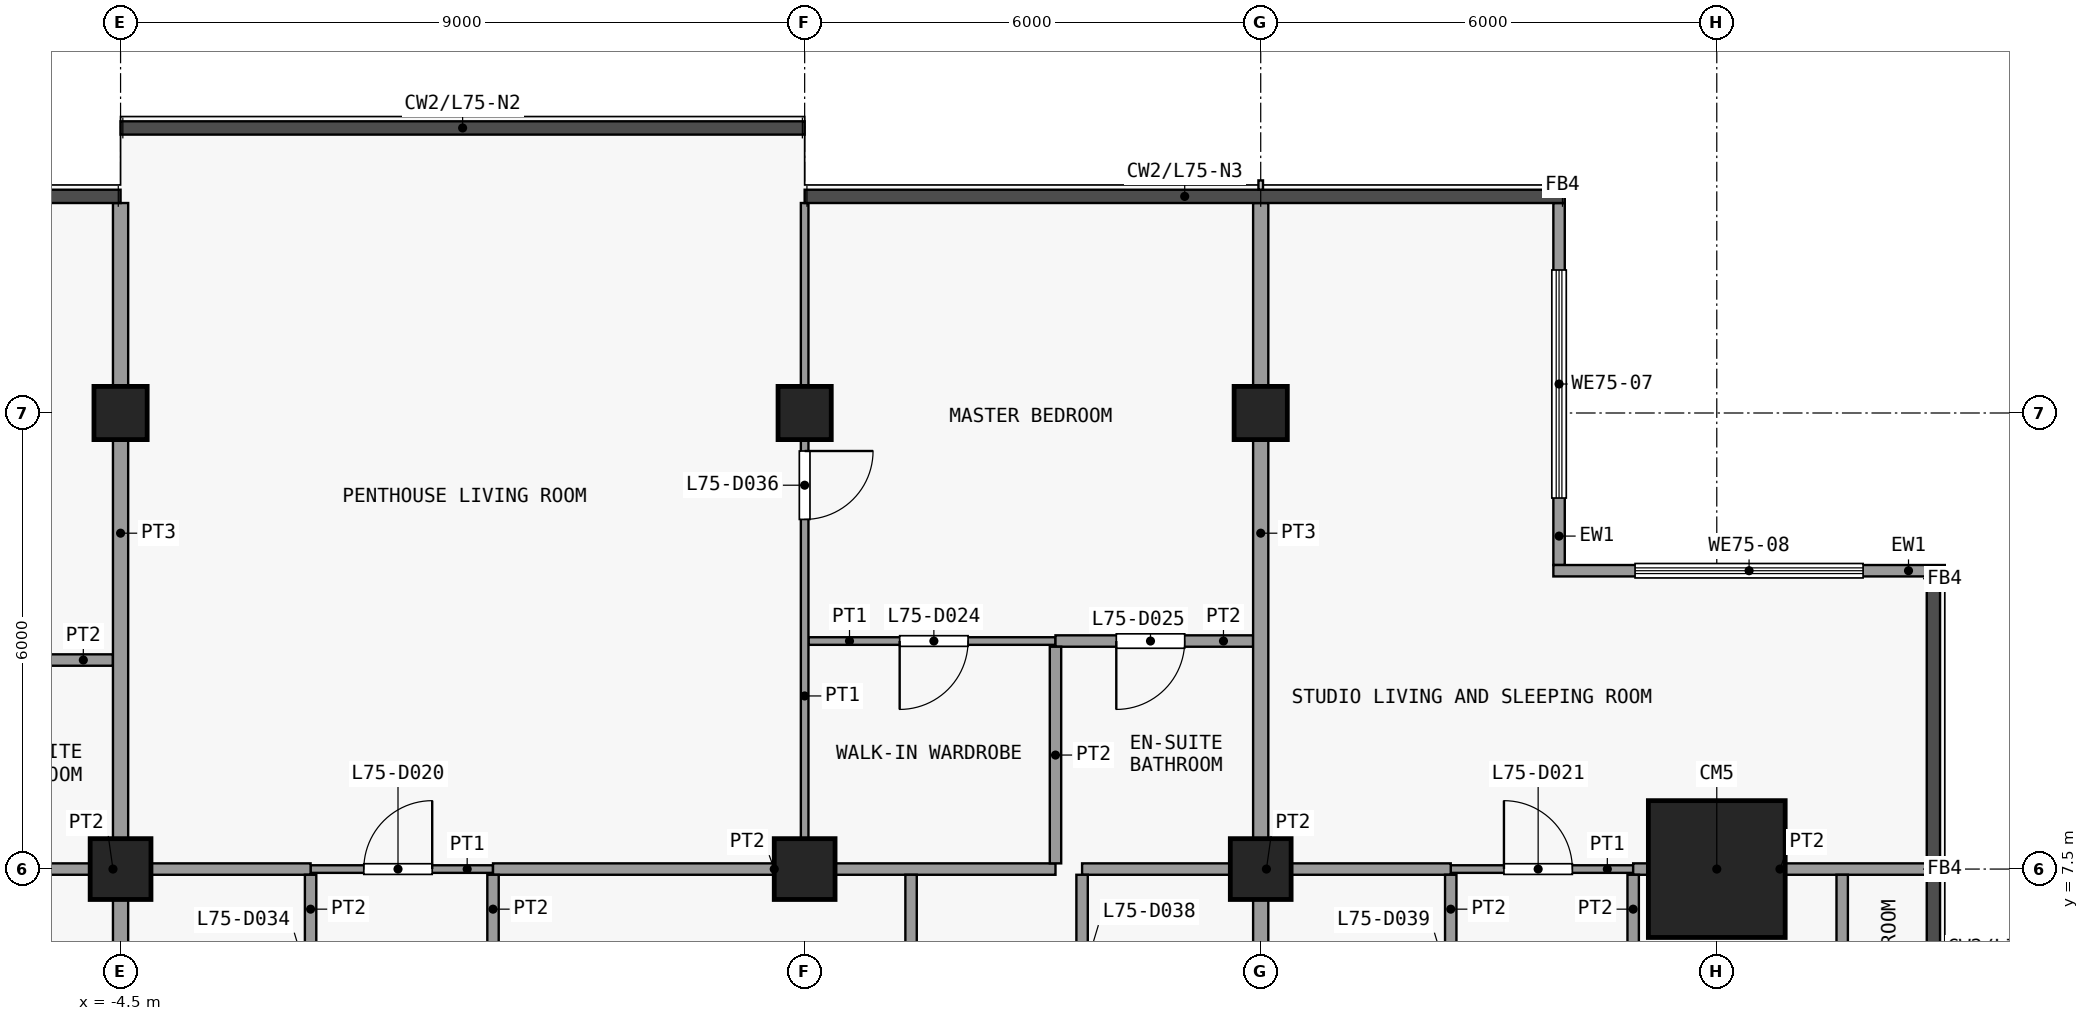
"""IFC4 building model, lengths in metres.
Left out: names, types, materials, properties, quantities, classifications, styles, units other than length and angle.
Written with IfcOpenShell. Run it as: python <this file> out.ifc"""

import sys

from ifc_helpers import new_model, si_unit, direction, frame, frame_2d, origin, origin_2d, place, context, subcontext, project, spatial, rectangle, extrude, element, fill, save


model = new_model("IFC4")
c1 = context("Model", 3, precision=1e-05, world=origin(), true_north=direction((0.0, 1.0)))
c2 = subcontext(c1, "Body", "Model", "MODEL_VIEW")
j1 = project(units=[si_unit("LENGTHUNIT", "METRE"), si_unit("PLANEANGLEUNIT", "RADIAN")], contexts=[c1])
p1 = place(None, origin())
s1 = spatial("IfcSite", under=j1, at=p1, CompositionType="ELEMENT")
p2 = place(p1, origin())
s2 = spatial("IfcBuilding", under=s1, at=p2, CompositionType="ELEMENT")
p3 = place(p2, frame((0.0, 0.0, 295.1)))
s3 = spatial("IfcBuildingStorey", under=s2, at=p3, CompositionType="ELEMENT", Elevation=295.1)
p4 = place(p3, frame((-4.5, 7.5, 0.0), z_axis=(0.0, 0.0, 1.0), x_axis=(1.0, 0.0, 0.0)))
e1 = element("IfcColumn", 1, at=p4, inside=s3, PredefinedType="COLUMN", context=c2, shape_type="SweptSolid", body=[
    extrude(rectangle(XDim=0.8, YDim=0.8, at=origin_2d()), origin(), (0.0, 0.0, 1.0), 3.6),
])
p5 = place(p3, frame((-4.5, 13.5, 0.0), z_axis=(0.0, 0.0, 1.0), x_axis=(1.0, 0.0, 0.0)))
e2 = element("IfcColumn", 2, at=p5, inside=s3, PredefinedType="COLUMN", context=c2, shape_type="SweptSolid", body=[
    extrude(rectangle(XDim=0.7, YDim=0.7, at=origin_2d()), origin(), (0.0, 0.0, 1.0), 3.6),
])
p6 = place(p3, frame((4.5, 7.5, 0.0), z_axis=(0.0, 0.0, 1.0), x_axis=(1.0, 0.0, 0.0)))
e3 = element("IfcColumn", 3, at=p6, inside=s3, PredefinedType="COLUMN", context=c2, shape_type="SweptSolid", body=[
    extrude(rectangle(XDim=0.8, YDim=0.8, at=origin_2d()), origin(), (0.0, 0.0, 1.0), 3.6),
])
p7 = place(p3, frame((4.5, 13.5, 0.0), z_axis=(0.0, 0.0, 1.0), x_axis=(1.0, 0.0, 0.0)))
e4 = element("IfcColumn", 4, at=p7, inside=s3, PredefinedType="COLUMN", context=c2, shape_type="SweptSolid", body=[
    extrude(rectangle(XDim=0.7, YDim=0.7, at=origin_2d()), origin(), (0.0, 0.0, 1.0), 3.6),
])
p8 = place(p3, frame((10.5, 7.5, 0.0), z_axis=(0.0, 0.0, 1.0), x_axis=(1.0, 0.0, 0.0)))
e5 = element("IfcColumn", 5, at=p8, inside=s3, PredefinedType="COLUMN", context=c2, shape_type="SweptSolid", body=[
    extrude(rectangle(XDim=0.8, YDim=0.8, at=origin_2d()), origin(), (0.0, 0.0, 1.0), 3.6),
])
p9 = place(p3, frame((10.5, 13.5, 0.0), z_axis=(0.0, 0.0, 1.0), x_axis=(1.0, 0.0, 0.0)))
e6 = element("IfcColumn", 6, at=p9, inside=s3, PredefinedType="COLUMN", context=c2, shape_type="SweptSolid", body=[
    extrude(rectangle(XDim=0.7, YDim=0.7, at=origin_2d()), origin(), (0.0, 0.0, 1.0), 3.6),
])
p10 = place(p3, frame((16.5, 7.5, 0.0), z_axis=(0.0, 0.0, 1.0), x_axis=(1.0, 0.0, 0.0)))
e7 = element("IfcColumn", 7, at=p10, inside=s3, PredefinedType="COLUMN", context=c2, shape_type="SweptSolid", body=[
    extrude(rectangle(XDim=1.8, YDim=1.8, at=origin_2d()), origin(), (0.0, 0.0, 1.0), 3.6),
])
p11 = place(p3, frame((14.425, 16.262, 0.0), z_axis=(0.0, 0.0, 1.0), x_axis=(0.0, -1.0, 0.0)))
e8 = element("IfcWall", 8, at=p11, inside=s3, PredefinedType="SOLIDWALL", context=c2, shape_type="SweptSolid", body=[
    extrude(rectangle(XDim=4.762, YDim=0.15, at=frame_2d((2.381, 0.0))), origin(), (0.0, 0.0, 1.0), 3.2),
])
p12 = place(p11, frame((0.881, 0.0, 0.9)))
e9 = element("IfcOpeningElement", 9, at=p12, cuts=e8, PredefinedType="OPENING", context=c2, shape_type="SweptSolid", body=[
    extrude(rectangle(XDim=3.0, YDim=2.4, at=frame_2d((1.5, 1.2))), frame((0.0, 0.085, 0.0), z_axis=(0.0, -1.0, 0.0), x_axis=(1.0, 0.0, 0.0)), (0.0, 0.0, 1.0), 0.17),
])
p13 = place(p3, frame((14.35, 11.425, 0.0), z_axis=(0.0, 0.0, 1.0), x_axis=(1.0, 0.0, 0.0)))
e10 = element("IfcWall", 10, at=p13, inside=s3, PredefinedType="SOLIDWALL", context=c2, shape_type="SweptSolid", body=[
    extrude(rectangle(XDim=5.15, YDim=0.15, at=frame_2d((2.575, 0.0))), origin(), (0.0, 0.0, 1.0), 3.2),
])
p14 = place(p13, frame((1.075, 0.0, 0.9)))
e11 = element("IfcOpeningElement", 11, at=p14, cuts=e10, PredefinedType="OPENING", context=c2, shape_type="SweptSolid", body=[
    extrude(rectangle(XDim=3.0, YDim=2.4, at=frame_2d((1.5, 1.2))), frame((0.0, 0.085, 0.0), z_axis=(0.0, -1.0, 0.0), x_axis=(1.0, 0.0, 0.0)), (0.0, 0.0, 1.0), 0.17),
])
p15 = place(p3, frame((-2.0, 7.5, 0.0), z_axis=(0.0, 0.0, 1.0), x_axis=(1.0, 0.0, 0.0)))
e12 = element("IfcWall", 12, at=p15, inside=s3, PredefinedType="PARTITIONING", context=c2, shape_type="SweptSolid", body=[
    extrude(rectangle(XDim=2.4, YDim=0.1, at=frame_2d((1.2, 0.0))), origin(), (0.0, 0.0, 1.0), 3.2),
])
p16 = place(p15, frame((0.7, 0.0, 0.0)))
e13 = element("IfcOpeningElement", 13, at=p16, cuts=e12, PredefinedType="OPENING", context=c2, shape_type="SweptSolid", body=[
    extrude(rectangle(XDim=0.9, YDim=2.1, at=frame_2d((0.45, 1.05))), frame((0.0, 0.06, 0.0), z_axis=(0.0, -1.0, 0.0), x_axis=(1.0, 0.0, 0.0)), (0.0, 0.0, 1.0), 0.12),
])
p17 = place(p3, frame((13.0, 7.5, 0.0), z_axis=(0.0, 0.0, 1.0), x_axis=(1.0, 0.0, 0.0)))
e14 = element("IfcWall", 14, at=p17, inside=s3, PredefinedType="PARTITIONING", context=c2, shape_type="SweptSolid", body=[
    extrude(rectangle(XDim=2.4, YDim=0.1, at=frame_2d((1.2, 0.0))), origin(), (0.0, 0.0, 1.0), 3.2),
])
p18 = place(p17, frame((0.7, 0.0, 0.0)))
e15 = element("IfcOpeningElement", 15, at=p18, cuts=e14, PredefinedType="OPENING", context=c2, shape_type="SweptSolid", body=[
    extrude(rectangle(XDim=0.9, YDim=2.1, at=frame_2d((0.45, 1.05))), frame((0.0, 0.06, 0.0), z_axis=(0.0, -1.0, 0.0), x_axis=(1.0, 0.0, 0.0)), (0.0, 0.0, 1.0), 0.12),
])
p19 = place(p3, frame((-7.2, 7.5, 0.0), z_axis=(0.0, 0.0, 1.0), x_axis=(1.0, 0.0, 0.0)))
e16 = element("IfcWall", 16, at=p19, inside=s3, PredefinedType="PARTITIONING", context=c2, shape_type="SweptSolid", body=[
    extrude(rectangle(XDim=5.2, YDim=0.15, at=frame_2d((2.6, 0.0))), origin(), (0.0, 0.0, 1.0), 3.2),
])
p20 = place(p3, frame((0.4, 7.5, 0.0), z_axis=(0.0, 0.0, 1.0), x_axis=(1.0, 0.0, 0.0)))
e17 = element("IfcWall", 17, at=p20, inside=s3, PredefinedType="PARTITIONING", context=c2, shape_type="SweptSolid", body=[
    extrude(rectangle(XDim=7.4, YDim=0.15, at=frame_2d((3.7, 0.0))), origin(), (0.0, 0.0, 1.0), 3.2),
])
p21 = place(p3, frame((8.15, 7.5, 0.0), z_axis=(0.0, 0.0, 1.0), x_axis=(1.0, 0.0, 0.0)))
e18 = element("IfcWall", 18, at=p21, inside=s3, PredefinedType="PARTITIONING", context=c2, shape_type="SweptSolid", body=[
    extrude(rectangle(XDim=4.85, YDim=0.15, at=frame_2d((2.425, 0.0))), origin(), (0.0, 0.0, 1.0), 3.2),
])
p22 = place(p3, frame((15.4, 7.5, 0.0), z_axis=(0.0, 0.0, 1.0), x_axis=(1.0, 0.0, 0.0)))
e19 = element("IfcWall", 19, at=p22, inside=s3, PredefinedType="PARTITIONING", context=c2, shape_type="SweptSolid", body=[
    extrude(rectangle(XDim=3.863, YDim=0.15, at=frame_2d((1.931, 0.0))), origin(), (0.0, 0.0, 1.0), 3.2),
])
p23 = place(p3, frame((-7.2, 10.25, 0.0), z_axis=(0.0, 0.0, 1.0), x_axis=(1.0, 0.0, 0.0)))
e20 = element("IfcWall", 20, at=p23, inside=s3, PredefinedType="PARTITIONING", context=c2, shape_type="SweptSolid", body=[
    extrude(rectangle(XDim=2.6, YDim=0.15, at=frame_2d((1.3, 0.0))), origin(), (0.0, 0.0, 1.0), 3.2),
])
p24 = place(p23, frame((0.8, 0.0, 0.0)))
e21 = element("IfcOpeningElement", 21, at=p24, cuts=e20, PredefinedType="OPENING", context=c2, shape_type="SweptSolid", body=[
    extrude(rectangle(XDim=0.9, YDim=2.1, at=frame_2d((0.45, 1.05))), frame((0.0, 0.085, 0.0), z_axis=(0.0, -1.0, 0.0), x_axis=(1.0, 0.0, 0.0)), (0.0, 0.0, 1.0), 0.17),
])
p25 = place(p3, frame((4.55, 10.5, 0.0), z_axis=(0.0, 0.0, 1.0), x_axis=(1.0, 0.0, 0.0)))
e22 = element("IfcWall", 22, at=p25, inside=s3, PredefinedType="PARTITIONING", context=c2, shape_type="SweptSolid", body=[
    extrude(rectangle(XDim=3.25, YDim=0.1, at=frame_2d((1.625, 0.0))), origin(), (0.0, 0.0, 1.0), 3.2),
])
p26 = place(p25, frame((1.2, 0.0, 0.0)))
e23 = element("IfcOpeningElement", 23, at=p26, cuts=e22, PredefinedType="OPENING", context=c2, shape_type="SweptSolid", body=[
    extrude(rectangle(XDim=0.9, YDim=2.1, at=frame_2d((0.45, 1.05))), frame((0.0, 0.06, 0.0), z_axis=(0.0, -1.0, 0.0), x_axis=(1.0, 0.0, 0.0)), (0.0, 0.0, 1.0), 0.12),
])
p27 = place(p3, frame((7.8, 10.5, 0.0), z_axis=(0.0, 0.0, 1.0), x_axis=(1.0, 0.0, 0.0)))
e24 = element("IfcWall", 24, at=p27, inside=s3, PredefinedType="PARTITIONING", context=c2, shape_type="SweptSolid", body=[
    extrude(rectangle(XDim=2.6, YDim=0.15, at=frame_2d((1.3, 0.0))), origin(), (0.0, 0.0, 1.0), 3.2),
])
p28 = place(p27, frame((0.8, 0.0, 0.0)))
e25 = element("IfcOpeningElement", 25, at=p28, cuts=e24, PredefinedType="OPENING", context=c2, shape_type="SweptSolid", body=[
    extrude(rectangle(XDim=0.9, YDim=2.1, at=frame_2d((0.45, 1.05))), frame((0.0, 0.085, 0.0), z_axis=(0.0, -1.0, 0.0), x_axis=(1.0, 0.0, 0.0)), (0.0, 0.0, 1.0), 0.17),
])
p29 = place(p3, frame((-4.5, 4.6, 0.0), z_axis=(0.0, 0.0, 1.0), x_axis=(0.0, 1.0, 0.0)))
e26 = element("IfcWall", 26, at=p29, inside=s3, PredefinedType="PARTITIONING", context=c2, shape_type="SweptSolid", body=[
    extrude(rectangle(XDim=2.825, YDim=0.2, at=frame_2d((1.413, 0.0))), origin(), (0.0, 0.0, 1.0), 3.2),
])
p30 = place(p3, frame((-4.5, 7.575, 0.0), z_axis=(0.0, 0.0, 1.0), x_axis=(0.0, 1.0, 0.0)))
e27 = element("IfcWall", 27, at=p30, inside=s3, PredefinedType="PARTITIONING", context=c2, shape_type="SweptSolid", body=[
    extrude(rectangle(XDim=8.688, YDim=0.2, at=frame_2d((4.344, 0.0))), origin(), (0.0, 0.0, 1.0), 3.2),
])
p31 = place(p3, frame((-2.0, 4.6, 0.0), z_axis=(0.0, 0.0, 1.0), x_axis=(0.0, 1.0, 0.0)))
e28 = element("IfcWall", 28, at=p31, inside=s3, PredefinedType="PARTITIONING", context=c2, shape_type="SweptSolid", body=[
    extrude(rectangle(XDim=2.825, YDim=0.15, at=frame_2d((1.413, 0.0))), origin(), (0.0, 0.0, 1.0), 3.2),
])
p32 = place(p31, frame((0.9, 0.0, 0.0)))
e29 = element("IfcOpeningElement", 29, at=p32, cuts=e28, PredefinedType="OPENING", context=c2, shape_type="SweptSolid", body=[
    extrude(rectangle(XDim=0.9, YDim=2.1, at=frame_2d((0.45, 1.05))), frame((0.0, 0.085, 0.0), z_axis=(0.0, -1.0, 0.0), x_axis=(1.0, 0.0, 0.0)), (0.0, 0.0, 1.0), 0.17),
])
p33 = place(p3, frame((0.4, 4.6, 0.0), z_axis=(0.0, 0.0, 1.0), x_axis=(0.0, 1.0, 0.0)))
e30 = element("IfcWall", 30, at=p33, inside=s3, PredefinedType="PARTITIONING", context=c2, shape_type="SweptSolid", body=[
    extrude(rectangle(XDim=2.825, YDim=0.15, at=frame_2d((1.413, 0.0))), origin(), (0.0, 0.0, 1.0), 3.2),
])
p34 = place(p33, frame((0.9, 0.0, 0.0)))
e31 = element("IfcOpeningElement", 31, at=p34, cuts=e30, PredefinedType="OPENING", context=c2, shape_type="SweptSolid", body=[
    extrude(rectangle(XDim=0.9, YDim=2.1, at=frame_2d((0.45, 1.05))), frame((0.0, 0.085, 0.0), z_axis=(0.0, -1.0, 0.0), x_axis=(1.0, 0.0, 0.0)), (0.0, 0.0, 1.0), 0.17),
])
p35 = place(p3, frame((4.5, 7.575, 0.0), z_axis=(0.0, 0.0, 1.0), x_axis=(0.0, 1.0, 0.0)))
e32 = element("IfcWall", 32, at=p35, inside=s3, PredefinedType="PARTITIONING", context=c2, shape_type="SweptSolid", body=[
    extrude(rectangle(XDim=8.688, YDim=0.1, at=frame_2d((4.344, 0.0))), origin(), (0.0, 0.0, 1.0), 3.2),
])
p36 = place(p35, frame((4.525, 0.0, 0.0)))
e33 = element("IfcOpeningElement", 33, at=p36, cuts=e32, PredefinedType="OPENING", context=c2, shape_type="SweptSolid", body=[
    extrude(rectangle(XDim=0.9, YDim=2.1, at=frame_2d((0.45, 1.05))), frame((0.0, 0.06, 0.0), z_axis=(0.0, -1.0, 0.0), x_axis=(1.0, 0.0, 0.0)), (0.0, 0.0, 1.0), 0.12),
])
p37 = place(p3, frame((5.9, 4.6, 0.0), z_axis=(0.0, 0.0, 1.0), x_axis=(0.0, 1.0, 0.0)))
e34 = element("IfcWall", 34, at=p37, inside=s3, PredefinedType="PARTITIONING", context=c2, shape_type="SweptSolid", body=[
    extrude(rectangle(XDim=2.825, YDim=0.15, at=frame_2d((1.413, 0.0))), origin(), (0.0, 0.0, 1.0), 3.2),
])
p38 = place(p37, frame((1.0, 0.0, 0.0)))
e35 = element("IfcOpeningElement", 35, at=p38, cuts=e34, PredefinedType="OPENING", context=c2, shape_type="SweptSolid", body=[
    extrude(rectangle(XDim=0.9, YDim=2.1, at=frame_2d((0.45, 1.05))), frame((0.0, 0.085, 0.0), z_axis=(0.0, -1.0, 0.0), x_axis=(1.0, 0.0, 0.0)), (0.0, 0.0, 1.0), 0.17),
])
p39 = place(p3, frame((7.8, 7.575, 0.0), z_axis=(0.0, 0.0, 1.0), x_axis=(0.0, 1.0, 0.0)))
e36 = element("IfcWall", 36, at=p39, inside=s3, PredefinedType="PARTITIONING", context=c2, shape_type="SweptSolid", body=[
    extrude(rectangle(XDim=2.85, YDim=0.15, at=frame_2d((1.425, 0.0))), origin(), (0.0, 0.0, 1.0), 3.2),
])
p40 = place(p3, frame((8.15, 4.6, 0.0), z_axis=(0.0, 0.0, 1.0), x_axis=(0.0, 1.0, 0.0)))
e37 = element("IfcWall", 37, at=p40, inside=s3, PredefinedType="PARTITIONING", context=c2, shape_type="SweptSolid", body=[
    extrude(rectangle(XDim=2.825, YDim=0.15, at=frame_2d((1.413, 0.0))), origin(), (0.0, 0.0, 1.0), 3.2),
])
p41 = place(p40, frame((1.0, 0.0, 0.0)))
e38 = element("IfcOpeningElement", 38, at=p41, cuts=e37, PredefinedType="OPENING", context=c2, shape_type="SweptSolid", body=[
    extrude(rectangle(XDim=0.9, YDim=2.1, at=frame_2d((0.45, 1.05))), frame((0.0, 0.085, 0.0), z_axis=(0.0, -1.0, 0.0), x_axis=(1.0, 0.0, 0.0)), (0.0, 0.0, 1.0), 0.17),
])
p42 = place(p3, frame((10.5, 4.6, 0.0), z_axis=(0.0, 0.0, 1.0), x_axis=(0.0, 1.0, 0.0)))
e39 = element("IfcWall", 39, at=p42, inside=s3, PredefinedType="PARTITIONING", context=c2, shape_type="SweptSolid", body=[
    extrude(rectangle(XDim=2.825, YDim=0.2, at=frame_2d((1.413, 0.0))), origin(), (0.0, 0.0, 1.0), 3.2),
])
p43 = place(p3, frame((10.5, 7.575, 0.0), z_axis=(0.0, 0.0, 1.0), x_axis=(0.0, 1.0, 0.0)))
e40 = element("IfcWall", 40, at=p43, inside=s3, PredefinedType="PARTITIONING", context=c2, shape_type="SweptSolid", body=[
    extrude(rectangle(XDim=8.688, YDim=0.2, at=frame_2d((4.344, 0.0))), origin(), (0.0, 0.0, 1.0), 3.2),
])
p44 = place(p3, frame((13.0, 4.6, 0.0), z_axis=(0.0, 0.0, 1.0), x_axis=(0.0, 1.0, 0.0)))
e41 = element("IfcWall", 41, at=p44, inside=s3, PredefinedType="PARTITIONING", context=c2, shape_type="SweptSolid", body=[
    extrude(rectangle(XDim=2.825, YDim=0.15, at=frame_2d((1.413, 0.0))), origin(), (0.0, 0.0, 1.0), 3.2),
])
p45 = place(p44, frame((0.9, 0.0, 0.0)))
e42 = element("IfcOpeningElement", 42, at=p45, cuts=e41, PredefinedType="OPENING", context=c2, shape_type="SweptSolid", body=[
    extrude(rectangle(XDim=0.9, YDim=2.1, at=frame_2d((0.45, 1.05))), frame((0.0, 0.085, 0.0), z_axis=(0.0, -1.0, 0.0), x_axis=(1.0, 0.0, 0.0)), (0.0, 0.0, 1.0), 0.17),
])
p46 = place(p3, frame((15.4, 4.6, 0.0), z_axis=(0.0, 0.0, 1.0), x_axis=(0.0, 1.0, 0.0)))
e43 = element("IfcWall", 43, at=p46, inside=s3, PredefinedType="PARTITIONING", context=c2, shape_type="SweptSolid", body=[
    extrude(rectangle(XDim=2.825, YDim=0.15, at=frame_2d((1.413, 0.0))), origin(), (0.0, 0.0, 1.0), 3.2),
])
p47 = place(p46, frame((0.9, 0.0, 0.0)))
e44 = element("IfcOpeningElement", 44, at=p47, cuts=e43, PredefinedType="OPENING", context=c2, shape_type="SweptSolid", body=[
    extrude(rectangle(XDim=0.9, YDim=2.1, at=frame_2d((0.45, 1.05))), frame((0.0, 0.085, 0.0), z_axis=(0.0, -1.0, 0.0), x_axis=(1.0, 0.0, 0.0)), (0.0, 0.0, 1.0), 0.17),
])
p48 = place(p3, frame((18.15, 4.6, 0.0), z_axis=(0.0, 0.0, 1.0), x_axis=(0.0, 1.0, 0.0)))
e45 = element("IfcWall", 45, at=p48, inside=s3, PredefinedType="PARTITIONING", context=c2, shape_type="SweptSolid", body=[
    extrude(rectangle(XDim=2.825, YDim=0.15, at=frame_2d((1.413, 0.0))), origin(), (0.0, 0.0, 1.0), 3.2),
])
p49 = place(p48, frame((1.0, 0.0, 0.0)))
e46 = element("IfcOpeningElement", 46, at=p49, cuts=e45, PredefinedType="OPENING", context=c2, shape_type="SweptSolid", body=[
    extrude(rectangle(XDim=0.9, YDim=2.1, at=frame_2d((0.45, 1.05))), frame((0.0, 0.085, 0.0), z_axis=(0.0, -1.0, 0.0), x_axis=(1.0, 0.0, 0.0)), (0.0, 0.0, 1.0), 0.17),
])
p50 = place(p12, origin())
e47 = element("IfcWindow", 47, at=p50, inside=s3, PartitioningType="SINGLE_PANEL", PredefinedType="WINDOW", context=c2, shape_type="SweptSolid", body=[
    extrude(rectangle(XDim=3.0, YDim=2.4, at=frame_2d((1.5, 1.2))), frame((0.0, 0.03, 0.0), z_axis=(0.0, -1.0, 0.0), x_axis=(1.0, 0.0, 0.0)), (0.0, 0.0, 1.0), 0.06),
])
fill(e9, e47)
p51 = place(p14, origin())
e48 = element("IfcWindow", 48, at=p51, inside=s3, PartitioningType="SINGLE_PANEL", PredefinedType="WINDOW", context=c2, shape_type="SweptSolid", body=[
    extrude(rectangle(XDim=3.0, YDim=2.4, at=frame_2d((1.5, 1.2))), frame((0.0, 0.03, 0.0), z_axis=(0.0, -1.0, 0.0), x_axis=(1.0, 0.0, 0.0)), (0.0, 0.0, 1.0), 0.06),
])
fill(e11, e48)
p52 = place(p16, origin())
e49 = element("IfcDoor", 49, at=p52, inside=s3, OperationType="SINGLE_SWING_LEFT", PredefinedType="DOOR", context=c2, shape_type="SweptSolid", body=[
    extrude(rectangle(XDim=0.9, YDim=2.1, at=frame_2d((0.45, 1.05))), frame((0.0, 0.025, 0.0), z_axis=(0.0, -1.0, 0.0), x_axis=(1.0, 0.0, 0.0)), (0.0, 0.0, 1.0), 0.05),
])
fill(e13, e49)
p53 = place(p18, origin())
e50 = element("IfcDoor", 50, at=p53, inside=s3, OperationType="SINGLE_SWING_RIGHT", PredefinedType="DOOR", context=c2, shape_type="SweptSolid", body=[
    extrude(rectangle(XDim=0.9, YDim=2.1, at=frame_2d((0.45, 1.05))), frame((0.0, 0.025, 0.0), z_axis=(0.0, -1.0, 0.0), x_axis=(1.0, 0.0, 0.0)), (0.0, 0.0, 1.0), 0.05),
])
fill(e15, e50)
p54 = place(p26, origin())
e51 = element("IfcDoor", 51, at=p54, inside=s3, OperationType="SINGLE_SWING_LEFT", PredefinedType="DOOR", context=c2, shape_type="SweptSolid", body=[
    extrude(rectangle(XDim=0.9, YDim=2.1, at=frame_2d((0.45, 1.05))), frame((0.0, 0.025, 0.0), z_axis=(0.0, -1.0, 0.0), x_axis=(1.0, 0.0, 0.0)), (0.0, 0.0, 1.0), 0.05),
])
fill(e23, e51)
p55 = place(p28, origin())
e52 = element("IfcDoor", 52, at=p55, inside=s3, OperationType="SINGLE_SWING_LEFT", PredefinedType="DOOR", context=c2, shape_type="SweptSolid", body=[
    extrude(rectangle(XDim=0.9, YDim=2.1, at=frame_2d((0.45, 1.05))), frame((0.0, 0.025, 0.0), z_axis=(0.0, -1.0, 0.0), x_axis=(1.0, 0.0, 0.0)), (0.0, 0.0, 1.0), 0.05),
])
fill(e25, e52)
p56 = place(p36, origin())
e53 = element("IfcDoor", 53, at=p56, inside=s3, OperationType="SINGLE_SWING_RIGHT", PredefinedType="DOOR", context=c2, shape_type="SweptSolid", body=[
    extrude(rectangle(XDim=0.9, YDim=2.1, at=frame_2d((0.45, 1.05))), frame((0.0, 0.025, 0.0), z_axis=(0.0, -1.0, 0.0), x_axis=(1.0, 0.0, 0.0)), (0.0, 0.0, 1.0), 0.05),
])
fill(e33, e53)
save(model, sys.argv[1])
